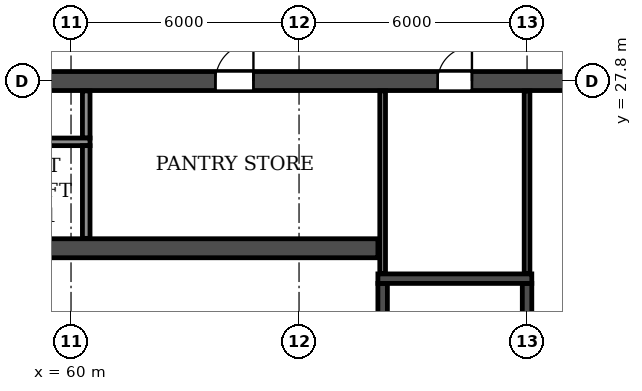
"""IFC4 building model, lengths in metres.
Left out: names, types, materials, properties, quantities, classifications, styles, units other than length and angle.
Written with IfcOpenShell. Run it as: python <this file> out.ifc"""

import sys

from ifc_helpers import new_model, si_unit, direction, frame, frame_2d, origin, place, context, subcontext, project, spatial, rectangle, extrude, element, fill, save


model = new_model("IFC4")
c1 = context("Model", 3, precision=1e-05, world=origin(), true_north=direction((0.0, 1.0)))
c2 = subcontext(c1, "Body", "Model", "MODEL_VIEW")
j1 = project(units=[si_unit("LENGTHUNIT", "METRE"), si_unit("PLANEANGLEUNIT", "RADIAN")], contexts=[c1])
p1 = place(None, origin())
s1 = spatial("IfcSite", under=j1, at=p1, CompositionType="ELEMENT")
p2 = place(p1, origin())
s2 = spatial("IfcBuilding", under=s1, at=p2, CompositionType="ELEMENT")
p3 = place(p2, frame((0.0, 0.0, 76.2)))
s3 = spatial("IfcBuildingStorey", under=s2, at=p3, CompositionType="ELEMENT", Elevation=76.2)
p4 = place(p3, frame((8.6, 27.8, 0.0), z_axis=(0.0, 0.0, 1.0), x_axis=(1.0, 0.0, 0.0)))
e1 = element("IfcWall", 1, at=p4, inside=s3, PredefinedType="SOLIDWALL", context=c2, shape_type="SweptSolid", body=[
    extrude(rectangle(XDim=84.8, YDim=0.5, at=frame_2d((42.4, 0.0))), origin(), (0.0, 0.0, 1.0), 3.06),
])
p5 = place(p4, frame((2.0, 0.0, 0.0)))
e2 = element("IfcOpeningElement", 2, at=p5, cuts=e1, PredefinedType="OPENING", context=c2, shape_type="SweptSolid", body=[
    extrude(rectangle(XDim=1.5, YDim=2.1, at=frame_2d((0.75, 1.05))), frame((0.0, 0.26, 0.0), z_axis=(0.0, -1.0, 0.0), x_axis=(1.0, 0.0, 0.0)), (0.0, 0.0, 1.0), 0.52),
])
p6 = place(p4, frame((6.95, 0.0, 0.0)))
e3 = element("IfcOpeningElement", 3, at=p6, cuts=e1, PredefinedType="OPENING", context=c2, shape_type="SweptSolid", body=[
    extrude(rectangle(XDim=1.0, YDim=2.1, at=frame_2d((0.5, 1.05))), frame((0.0, 0.26, 0.0), z_axis=(0.0, -1.0, 0.0), x_axis=(1.0, 0.0, 0.0)), (0.0, 0.0, 1.0), 0.52),
])
p7 = place(p4, frame((10.3, 0.0, 0.0)))
e4 = element("IfcOpeningElement", 4, at=p7, cuts=e1, PredefinedType="OPENING", context=c2, shape_type="SweptSolid", body=[
    extrude(rectangle(XDim=1.0, YDim=2.1, at=frame_2d((0.5, 1.05))), frame((0.0, 0.26, 0.0), z_axis=(0.0, -1.0, 0.0), x_axis=(1.0, 0.0, 0.0)), (0.0, 0.0, 1.0), 0.52),
])
p8 = place(p4, frame((13.65, 0.0, 0.0)))
e5 = element("IfcOpeningElement", 5, at=p8, cuts=e1, PredefinedType="OPENING", context=c2, shape_type="SweptSolid", body=[
    extrude(rectangle(XDim=0.9, YDim=2.1, at=frame_2d((0.45, 1.05))), frame((0.0, 0.26, 0.0), z_axis=(0.0, -1.0, 0.0), x_axis=(1.0, 0.0, 0.0)), (0.0, 0.0, 1.0), 0.52),
])
p9 = place(p4, frame((22.85, 0.0, 0.0)))
e6 = element("IfcOpeningElement", 6, at=p9, cuts=e1, PredefinedType="OPENING", context=c2, shape_type="SweptSolid", body=[
    extrude(rectangle(XDim=0.9, YDim=2.1, at=frame_2d((0.45, 1.05))), frame((0.0, 0.26, 0.0), z_axis=(0.0, -1.0, 0.0), x_axis=(1.0, 0.0, 0.0)), (0.0, 0.0, 1.0), 0.52),
])
p10 = place(p4, frame((26.0, 0.0, 0.0)))
e7 = element("IfcOpeningElement", 7, at=p10, cuts=e1, PredefinedType="OPENING", context=c2, shape_type="SweptSolid", body=[
    extrude(rectangle(XDim=1.0, YDim=2.1, at=frame_2d((0.5, 1.05))), frame((0.0, 0.26, 0.0), z_axis=(0.0, -1.0, 0.0), x_axis=(1.0, 0.0, 0.0)), (0.0, 0.0, 1.0), 0.52),
])
p11 = place(p4, frame((31.2, 0.0, 0.0)))
e8 = element("IfcOpeningElement", 8, at=p11, cuts=e1, PredefinedType="OPENING", context=c2, shape_type="SweptSolid", body=[
    extrude(rectangle(XDim=1.0, YDim=2.1, at=frame_2d((0.5, 1.05))), frame((0.0, 0.26, 0.0), z_axis=(0.0, -1.0, 0.0), x_axis=(1.0, 0.0, 0.0)), (0.0, 0.0, 1.0), 0.52),
])
p12 = place(p4, frame((39.0, 0.0, 0.0)))
e9 = element("IfcOpeningElement", 9, at=p12, cuts=e1, PredefinedType="OPENING", context=c2, shape_type="SweptSolid", body=[
    extrude(rectangle(XDim=1.0, YDim=2.1, at=frame_2d((0.5, 1.05))), frame((0.0, 0.26, 0.0), z_axis=(0.0, -1.0, 0.0), x_axis=(1.0, 0.0, 0.0)), (0.0, 0.0, 1.0), 0.52),
])
p13 = place(p4, frame((41.9, 0.0, 0.0)))
e10 = element("IfcOpeningElement", 10, at=p13, cuts=e1, PredefinedType="OPENING", context=c2, shape_type="SweptSolid", body=[
    extrude(rectangle(XDim=1.0, YDim=2.1, at=frame_2d((0.5, 1.05))), frame((0.0, 0.26, 0.0), z_axis=(0.0, -1.0, 0.0), x_axis=(1.0, 0.0, 0.0)), (0.0, 0.0, 1.0), 0.52),
])
p14 = place(p4, frame((44.8, 0.0, 0.0)))
e11 = element("IfcOpeningElement", 11, at=p14, cuts=e1, PredefinedType="OPENING", context=c2, shape_type="SweptSolid", body=[
    extrude(rectangle(XDim=1.0, YDim=2.1, at=frame_2d((0.5, 1.05))), frame((0.0, 0.26, 0.0), z_axis=(0.0, -1.0, 0.0), x_axis=(1.0, 0.0, 0.0)), (0.0, 0.0, 1.0), 0.52),
])
p15 = place(p4, frame((48.7, 0.0, 0.0)))
e12 = element("IfcOpeningElement", 12, at=p15, cuts=e1, PredefinedType="OPENING", context=c2, shape_type="SweptSolid", body=[
    extrude(rectangle(XDim=1.0, YDim=2.1, at=frame_2d((0.5, 1.05))), frame((0.0, 0.26, 0.0), z_axis=(0.0, -1.0, 0.0), x_axis=(1.0, 0.0, 0.0)), (0.0, 0.0, 1.0), 0.52),
])
p16 = place(p4, frame((55.2, 0.0, 0.0)))
e13 = element("IfcOpeningElement", 13, at=p16, cuts=e1, PredefinedType="OPENING", context=c2, shape_type="SweptSolid", body=[
    extrude(rectangle(XDim=1.0, YDim=2.1, at=frame_2d((0.5, 1.05))), frame((0.0, 0.26, 0.0), z_axis=(0.0, -1.0, 0.0), x_axis=(1.0, 0.0, 0.0)), (0.0, 0.0, 1.0), 0.52),
])
p17 = place(p4, frame((61.05, 0.0, 0.0)))
e14 = element("IfcOpeningElement", 14, at=p17, cuts=e1, PredefinedType="OPENING", context=c2, shape_type="SweptSolid", body=[
    extrude(rectangle(XDim=0.9, YDim=2.1, at=frame_2d((0.45, 1.05))), frame((0.0, 0.26, 0.0), z_axis=(0.0, -1.0, 0.0), x_axis=(1.0, 0.0, 0.0)), (0.0, 0.0, 1.0), 0.52),
])
p18 = place(p4, frame((70.25, 0.0, 0.0)))
e15 = element("IfcOpeningElement", 15, at=p18, cuts=e1, PredefinedType="OPENING", context=c2, shape_type="SweptSolid", body=[
    extrude(rectangle(XDim=0.9, YDim=2.1, at=frame_2d((0.45, 1.05))), frame((0.0, 0.26, 0.0), z_axis=(0.0, -1.0, 0.0), x_axis=(1.0, 0.0, 0.0)), (0.0, 0.0, 1.0), 0.52),
])
p19 = place(p4, frame((73.5, 0.0, 0.0)))
e16 = element("IfcOpeningElement", 16, at=p19, cuts=e1, PredefinedType="OPENING", context=c2, shape_type="SweptSolid", body=[
    extrude(rectangle(XDim=1.0, YDim=2.1, at=frame_2d((0.5, 1.05))), frame((0.0, 0.26, 0.0), z_axis=(0.0, -1.0, 0.0), x_axis=(1.0, 0.0, 0.0)), (0.0, 0.0, 1.0), 0.52),
])
p20 = place(p4, frame((76.25, 0.0, 0.0)))
e17 = element("IfcOpeningElement", 17, at=p20, cuts=e1, PredefinedType="OPENING", context=c2, shape_type="SweptSolid", body=[
    extrude(rectangle(XDim=1.0, YDim=2.1, at=frame_2d((0.5, 1.05))), frame((0.0, 0.26, 0.0), z_axis=(0.0, -1.0, 0.0), x_axis=(1.0, 0.0, 0.0)), (0.0, 0.0, 1.0), 0.52),
])
p21 = place(p4, frame((80.95, 0.0, 0.0)))
e18 = element("IfcOpeningElement", 18, at=p21, cuts=e1, PredefinedType="OPENING", context=c2, shape_type="SweptSolid", body=[
    extrude(rectangle(XDim=1.0, YDim=2.1, at=frame_2d((0.5, 1.05))), frame((0.0, 0.26, 0.0), z_axis=(0.0, -1.0, 0.0), x_axis=(1.0, 0.0, 0.0)), (0.0, 0.0, 1.0), 0.52),
])
p22 = place(p3, frame((33.925, 23.4, 0.0), z_axis=(0.0, 0.0, 1.0), x_axis=(1.0, 0.0, 0.0)))
e19 = element("IfcWall", 19, at=p22, inside=s3, PredefinedType="SOLIDWALL", context=c2, shape_type="SweptSolid", body=[
    extrude(rectangle(XDim=34.15, YDim=0.5, at=frame_2d((17.075, 0.0))), origin(), (0.0, 0.0, 1.0), 3.06),
])
p23 = place(p22, frame((16.175, 0.0, 0.0)))
e20 = element("IfcOpeningElement", 20, at=p23, cuts=e19, PredefinedType="OPENING", context=c2, shape_type="SweptSolid", body=[
    extrude(rectangle(XDim=1.8, YDim=2.1, at=frame_2d((0.9, 1.05))), frame((0.0, 0.26, 0.0), z_axis=(0.0, -1.0, 0.0), x_axis=(1.0, 0.0, 0.0)), (0.0, 0.0, 1.0), 0.52),
])
p24 = place(p22, frame((11.025, 0.0, 0.0)))
e21 = element("IfcOpeningElement", 21, at=p24, cuts=e19, PredefinedType="OPENING", context=c2, shape_type="SweptSolid", body=[
    extrude(rectangle(XDim=1.1, YDim=2.1, at=frame_2d((0.55, 1.05))), frame((0.0, 0.26, 0.0), z_axis=(0.0, -1.0, 0.0), x_axis=(1.0, 0.0, 0.0)), (0.0, 0.0, 1.0), 0.52),
])
p25 = place(p3, frame((68.2, 14.85, 0.0), z_axis=(0.0, 0.0, 1.0), x_axis=(0.0, 1.0, 0.0)))
e22 = element("IfcWall", 22, at=p25, inside=s3, PredefinedType="SOLIDWALL", context=c2, shape_type="SweptSolid", body=[
    extrude(rectangle(XDim=7.625, YDim=0.25, at=frame_2d((3.812, 0.0))), origin(), (0.0, 0.0, 1.0), 3.06),
])
p26 = place(p25, frame((0.45, 0.0, 0.0)))
e23 = element("IfcOpeningElement", 23, at=p26, cuts=e22, PredefinedType="OPENING", context=c2, shape_type="SweptSolid", body=[
    extrude(rectangle(XDim=1.0, YDim=2.1, at=frame_2d((0.5, 1.05))), frame((0.0, 0.135, 0.0), z_axis=(0.0, -1.0, 0.0), x_axis=(1.0, 0.0, 0.0)), (0.0, 0.0, 1.0), 0.27),
])
p27 = place(p3, frame((72.0, 14.85, 0.0), z_axis=(0.0, 0.0, 1.0), x_axis=(0.0, 1.0, 0.0)))
e24 = element("IfcWall", 24, at=p27, inside=s3, PredefinedType="SOLIDWALL", context=c2, shape_type="SweptSolid", body=[
    extrude(rectangle(XDim=7.625, YDim=0.25, at=frame_2d((3.812, 0.0))), origin(), (0.0, 0.0, 1.0), 3.06),
])
p28 = place(p3, frame((68.075, 22.6, 0.0), z_axis=(0.0, 0.0, 1.0), x_axis=(1.0, 0.0, 0.0)))
e25 = element("IfcWall", 25, at=p28, inside=s3, PredefinedType="SOLIDWALL", context=c2, shape_type="SweptSolid", body=[
    extrude(rectangle(XDim=4.05, YDim=0.25, at=frame_2d((2.025, 0.0))), origin(), (0.0, 0.0, 1.0), 3.06),
])
p29 = place(p3, frame((60.4, 26.3, 0.0), z_axis=(0.0, 0.0, 1.0), x_axis=(0.0, 1.0, 0.0)))
e26 = element("IfcWall", 26, at=p29, inside=s3, PredefinedType="PARTITIONING", context=c2, shape_type="SweptSolid", body=[
    extrude(rectangle(XDim=1.24, YDim=0.2, at=frame_2d((0.62, 0.0))), origin(), (0.0, 0.0, 1.0), 3.06),
])
for number, where, z_axis, x_axis in (
    (27, (68.2, 22.735, 0.0), (0.0, 0.0, 1.0), (0.0, 1.0, 0.0)),
    (28, (72.0, 22.735, 0.0), (0.0, 0.0, 1.0), (0.0, 1.0, 0.0)),
):
    element("IfcWall", number, at=place(p3, frame(where, z_axis=z_axis, x_axis=x_axis)), inside=s3, PredefinedType="PARTITIONING", context=c2, shape_type="SweptSolid", body=[
        extrude(rectangle(XDim=4.805, YDim=0.15, at=frame_2d((2.402, 0.0))), origin(), (0.0, 0.0, 1.0), 3.06),
    ])
p30 = place(p3, frame((52.5, 26.2, 0.0), z_axis=(0.0, 0.0, 1.0), x_axis=(1.0, 0.0, 0.0)))
e29 = element("IfcWall", 29, at=p30, inside=s3, PredefinedType="PARTITIONING", context=c2, shape_type="SweptSolid", body=[
    extrude(rectangle(XDim=8.0, YDim=0.2, at=frame_2d((4.0, 0.0))), origin(), (0.0, 0.0, 1.0), 3.06),
])
p31 = place(p3, frame((60.4, 23.66, 0.0), z_axis=(0.0, 0.0, 1.0), x_axis=(0.0, 1.0, 0.0)))
e30 = element("IfcWall", 30, at=p31, inside=s3, PredefinedType="PARTITIONING", context=c2, shape_type="SweptSolid", body=[
    extrude(rectangle(XDim=2.44, YDim=0.2, at=frame_2d((1.22, 0.0))), origin(), (0.0, 0.0, 1.0), 3.06),
])
p32 = place(p16, origin())
e31 = element("IfcDoor", 31, at=p32, inside=s3, OperationType="SINGLE_SWING_RIGHT", PredefinedType="DOOR", context=c2, shape_type="SweptSolid", body=[
    extrude(rectangle(XDim=1.0, YDim=2.1, at=frame_2d((0.5, 1.05))), frame((0.0, 0.025, 0.0), z_axis=(0.0, -1.0, 0.0), x_axis=(1.0, 0.0, 0.0)), (0.0, 0.0, 1.0), 0.05),
])
fill(e13, e31)
p33 = place(p17, origin())
e32 = element("IfcDoor", 32, at=p33, inside=s3, OperationType="SINGLE_SWING_RIGHT", PredefinedType="DOOR", context=c2, shape_type="SweptSolid", body=[
    extrude(rectangle(XDim=0.9, YDim=2.1, at=frame_2d((0.45, 1.05))), frame((0.0, 0.025, 0.0), z_axis=(0.0, -1.0, 0.0), x_axis=(1.0, 0.0, 0.0)), (0.0, 0.0, 1.0), 0.05),
])
fill(e14, e32)
save(model, sys.argv[1])
